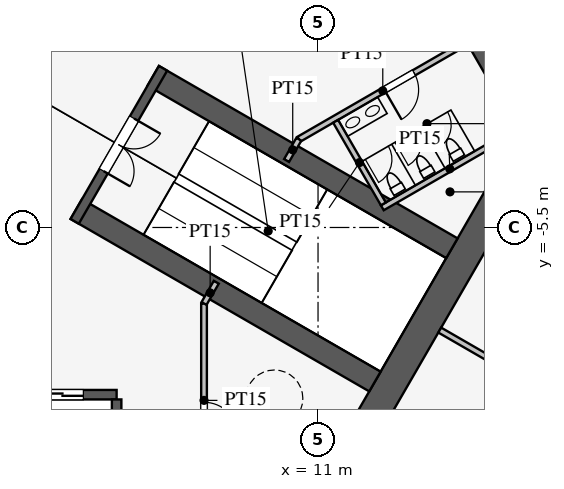
"""IFC4 building model, lengths in metres.
Left out: names, types, materials, properties, quantities, classifications, styles, units other than length and angle.
Written with IfcOpenShell. Run it as: python <this file> out.ifc"""

import sys

from ifc_helpers import new_model, si_unit, direction, frame, frame_2d, origin, place, context, subcontext, project, spatial, rectangle, extrude, element, fill, save


model = new_model("IFC4")
c1 = context("Model", 3, precision=1e-05, world=origin(), true_north=direction((0.0, 1.0)))
c2 = subcontext(c1, "Body", "Model", "MODEL_VIEW")
j1 = project(units=[si_unit("LENGTHUNIT", "METRE"), si_unit("PLANEANGLEUNIT", "RADIAN")], contexts=[c1])
p1 = place(None, origin())
s1 = spatial("IfcSite", under=j1, at=p1, CompositionType="ELEMENT")
p2 = place(p1, origin())
s2 = spatial("IfcBuilding", under=s1, at=p2, CompositionType="ELEMENT")
p3 = place(p2, frame((0.0, 0.0, 29.1)))
s3 = spatial("IfcBuildingStorey", under=s2, at=p3, CompositionType="ELEMENT", Elevation=29.1)
p4 = place(p3, frame((10.97, -13.0, 0.0), z_axis=(0.0, 0.0, 1.0), x_axis=(0.499995765644, 0.866027848477, 0.0)))
e1 = element("IfcWall", 1, at=p4, inside=s3, PredefinedType="SHEAR", context=c2, shape_type="SweptSolid", body=[
    extrude(rectangle(XDim=11.547, YDim=0.8, at=frame_2d((5.773, 0.0))), origin(), (0.0, 0.0, 1.0), 4.2),
])
p5 = place(p3, frame((16.743, -3.0, 0.0), z_axis=(0.0, 0.0, 1.0), x_axis=(-0.500002442456, 0.866023993627, 0.0)))
e2 = element("IfcWall", 2, at=p5, inside=s3, PredefinedType="SHEAR", context=c2, shape_type="SweptSolid", body=[
    extrude(rectangle(XDim=21.939, YDim=0.8, at=frame_2d((10.97, 0.0))), origin(), (0.0, 0.0, 1.0), 4.2),
])
p6 = place(p5, frame((17.27, 0.0, 0.0)))
e3 = element("IfcOpeningElement", 3, at=p6, cuts=e2, PredefinedType="OPENING", context=c2, shape_type="SweptSolid", body=[
    extrude(rectangle(XDim=1.2, YDim=2.1, at=frame_2d((0.6, 1.05))), frame((0.0, 0.41, 0.0), z_axis=(0.0, -1.0, 0.0), x_axis=(1.0, 0.0, 0.0)), (0.0, 0.0, 1.0), 0.82),
])
p7 = place(p5, frame((3.47, 0.0, 0.0)))
e4 = element("IfcOpeningElement", 4, at=p7, cuts=e2, PredefinedType="OPENING", context=c2, shape_type="SweptSolid", body=[
    extrude(rectangle(XDim=1.2, YDim=2.1, at=frame_2d((0.6, 1.05))), frame((0.0, 0.41, 0.0), z_axis=(0.0, -1.0, 0.0), x_axis=(1.0, 0.0, 0.0)), (0.0, 0.0, 1.0), 0.82),
])
p8 = place(p3, frame((-5.7, -9.9, 0.0), z_axis=(0.0, 0.0, 1.0), x_axis=(1.0, 0.0, 0.0)))
e5 = element("IfcWall", 5, at=p8, inside=s3, PredefinedType="SHEAR", context=c2, shape_type="SweptSolid", body=[
    extrude(rectangle(XDim=11.4, YDim=0.25, at=frame_2d((5.7, 0.0))), origin(), (0.0, 0.0, 1.0), 4.2),
])
p9 = place(p8, frame((0.875, 0.0, 0.0)))
e6 = element("IfcOpeningElement", 6, at=p9, cuts=e5, PredefinedType="OPENING", context=c2, shape_type="SweptSolid", body=[
    extrude(rectangle(XDim=1.1, YDim=2.2, at=frame_2d((0.55, 1.1))), frame((0.0, 0.135, 0.0), z_axis=(0.0, -1.0, 0.0), x_axis=(1.0, 0.0, 0.0)), (0.0, 0.0, 1.0), 0.27),
])
p10 = place(p8, frame((3.725, 0.0, 0.0)))
e7 = element("IfcOpeningElement", 7, at=p10, cuts=e5, PredefinedType="OPENING", context=c2, shape_type="SweptSolid", body=[
    extrude(rectangle(XDim=1.1, YDim=2.2, at=frame_2d((0.55, 1.1))), frame((0.0, 0.135, 0.0), z_axis=(0.0, -1.0, 0.0), x_axis=(1.0, 0.0, 0.0)), (0.0, 0.0, 1.0), 0.27),
])
p11 = place(p8, frame((6.575, 0.0, 0.0)))
e8 = element("IfcOpeningElement", 8, at=p11, cuts=e5, PredefinedType="OPENING", context=c2, shape_type="SweptSolid", body=[
    extrude(rectangle(XDim=1.1, YDim=2.2, at=frame_2d((0.55, 1.1))), frame((0.0, 0.135, 0.0), z_axis=(0.0, -1.0, 0.0), x_axis=(1.0, 0.0, 0.0)), (0.0, 0.0, 1.0), 0.27),
])
p12 = place(p8, frame((9.425, 0.0, 0.0)))
e9 = element("IfcOpeningElement", 9, at=p12, cuts=e5, PredefinedType="OPENING", context=c2, shape_type="SweptSolid", body=[
    extrude(rectangle(XDim=1.1, YDim=2.2, at=frame_2d((0.55, 1.1))), frame((0.0, 0.135, 0.0), z_axis=(0.0, -1.0, 0.0), x_axis=(1.0, 0.0, 0.0)), (0.0, 0.0, 1.0), 0.27),
])
p13 = place(p3, frame((5.7, -10.025, 0.0), z_axis=(0.0, 0.0, 1.0), x_axis=(0.0, -1.0, 0.0)))
e10 = element("IfcWall", 10, at=p13, inside=s3, PredefinedType="SHEAR", context=c2, shape_type="SweptSolid", body=[
    extrude(rectangle(XDim=2.575, YDim=0.25, at=frame_2d((1.288, 0.0))), origin(), (0.0, 0.0, 1.0), 4.2),
])
for number, where, z_axis, x_axis in (
    (11, (4.638, -5.016, 0.0), (0.0, 0.0, 1.0), (0.866, -0.5, 0.0)),
    (12, (6.663, -1.509, 0.0), (0.0, 0.0, 1.0), (0.866, -0.5, 0.0)),
):
    element("IfcWall", number, at=place(p3, frame(where, z_axis=z_axis, x_axis=x_axis)), inside=s3, PredefinedType="SHEAR", context=c2, shape_type="SweptSolid", body=[
        extrude(rectangle(XDim=9.075, YDim=0.6, at=frame_2d((4.538, 0.0))), origin(), (0.0, 0.0, 1.0), 4.2),
    ])
p14 = place(p3, frame((4.597, -5.339, 0.0), z_axis=(0.0, 0.0, 1.0), x_axis=(0.499984536904, 0.866034331223, 0.0)))
e13 = element("IfcWall", 13, at=p14, inside=s3, PredefinedType="SHEAR", context=c2, shape_type="SweptSolid", body=[
    extrude(rectangle(XDim=4.65, YDim=0.25, at=frame_2d((2.325, 0.0))), origin(), (0.0, 0.0, 1.0), 4.2),
])
p15 = place(p14, frame((1.525, 0.0, 0.0)))
e14 = element("IfcOpeningElement", 14, at=p15, cuts=e13, PredefinedType="OPENING", context=c2, shape_type="SweptSolid", body=[
    extrude(rectangle(XDim=1.6, YDim=2.1, at=frame_2d((0.8, 1.05))), frame((0.0, 0.135, 0.0), z_axis=(0.0, -1.0, 0.0), x_axis=(1.0, 0.0, 0.0)), (0.0, 0.0, 1.0), 0.27),
])
p16 = place(p3, frame((8.0, -7.5, 0.0), z_axis=(0.0, 0.0, 1.0), x_axis=(0.0, -1.0, 0.0)))
e15 = element("IfcWall", 15, at=p16, inside=s3, PredefinedType="PARTITIONING", context=c2, shape_type="SweptSolid", body=[
    extrude(rectangle(XDim=5.1, YDim=0.15, at=frame_2d((2.55, 0.0))), origin(), (0.0, 0.0, 1.0), 4.0),
])
p17 = place(p16, frame((2.6, 0.0, 0.0)))
e16 = element("IfcOpeningElement", 16, at=p17, cuts=e15, PredefinedType="OPENING", context=c2, shape_type="SweptSolid", body=[
    extrude(rectangle(XDim=0.9, YDim=2.1, at=frame_2d((0.45, 1.05))), frame((0.0, 0.085, 0.0), z_axis=(0.0, -1.0, 0.0), x_axis=(1.0, 0.0, 0.0)), (0.0, 0.0, 1.0), 0.17),
])
p18 = place(p3, frame((10.495, -3.178, 0.0), z_axis=(0.0, 0.0, 1.0), x_axis=(0.86602216432, 0.500005610874, 0.0)))
e17 = element("IfcWall", 17, at=p18, inside=s3, PredefinedType="PARTITIONING", context=c2, shape_type="SweptSolid", body=[
    extrude(rectangle(XDim=5.1, YDim=0.15, at=frame_2d((2.55, 0.0))), origin(), (0.0, 0.0, 1.0), 4.0),
])
p19 = place(p18, frame((2.6, 0.0, 0.0)))
e18 = element("IfcOpeningElement", 18, at=p19, cuts=e17, PredefinedType="OPENING", context=c2, shape_type="SweptSolid", body=[
    extrude(rectangle(XDim=0.9, YDim=2.1, at=frame_2d((0.45, 1.05))), frame((0.0, 0.085, 0.0), z_axis=(0.0, -1.0, 0.0), x_axis=(1.0, 0.0, 0.0)), (0.0, 0.0, 1.0), 0.17),
])
for number, where, z_axis, x_axis in (
    (19, (8.0, -7.5, 0.0), (0.0, 0.0, 1.0), (0.5, 0.866, 0.0)),
    (20, (10.495, -3.178, 0.0), (0.0, 0.0, 1.0), (-0.5, -0.866, 0.0)),
):
    element("IfcWall", number, at=place(p3, frame(where, z_axis=z_axis, x_axis=x_axis)), inside=s3, PredefinedType="PARTITIONING", context=c2, shape_type="SweptSolid", body=[
        extrude(rectangle(XDim=0.645, YDim=0.15, at=frame_2d((0.323, 0.0))), origin(), (0.0, 0.0, 1.0), 4.0),
    ])
p20 = place(p3, frame((12.691, -4.982, 0.0), z_axis=(0.0, 0.0, 1.0), x_axis=(0.8660249478, 0.500000789788, 0.0)))
e21 = element("IfcWall", 21, at=p20, inside=s3, PredefinedType="PARTITIONING", context=c2, shape_type="SweptSolid", body=[
    extrude(rectangle(XDim=4.1, YDim=0.15, at=frame_2d((2.05, 0.0))), origin(), (0.0, 0.0, 1.0), 4.0),
])
p21 = place(p3, frame((11.464, -2.706, 0.0), z_axis=(0.0, 0.0, 1.0), x_axis=(0.50001992892, -0.866013897511, 0.0)))
e22 = element("IfcWall", 22, at=p21, inside=s3, PredefinedType="PARTITIONING", context=c2, shape_type="SweptSolid", body=[
    extrude(rectangle(XDim=2.51, YDim=0.15, at=frame_2d((1.255, 0.0))), origin(), (0.0, 0.0, 1.0), 4.0),
])
p22 = place(p3, frame((14.203, -8.2, 0.0), z_axis=(0.0, 0.0, 1.0), x_axis=(0.866024965723, -0.500000758745, 0.0)))
e23 = element("IfcWall", 23, at=p22, inside=s3, PredefinedType="PARTITIONING", context=c2, shape_type="SweptSolid", body=[
    extrude(rectangle(XDim=18.25, YDim=0.15, at=frame_2d((9.125, 0.0))), origin(), (0.0, 0.0, 1.0), 2.3),
])
p23 = place(p17, origin())
e24 = element("IfcDoor", 24, at=p23, inside=s3, OperationType="SINGLE_SWING_RIGHT", PredefinedType="DOOR", context=c2, shape_type="SweptSolid", body=[
    extrude(rectangle(XDim=0.9, YDim=2.1, at=frame_2d((0.45, 1.05))), frame((0.0, 0.025, 0.0), z_axis=(0.0, -1.0, 0.0), x_axis=(1.0, 0.0, 0.0)), (0.0, 0.0, 1.0), 0.05),
])
fill(e16, e24)
p24 = place(p19, frame((0.9, 0.0, 0.0), z_axis=(0.0, 0.0, 1.0), x_axis=(-1.0, 0.0, 0.0)))
e25 = element("IfcDoor", 25, at=p24, inside=s3, OperationType="SINGLE_SWING_RIGHT", PredefinedType="DOOR", context=c2, shape_type="SweptSolid", body=[
    extrude(rectangle(XDim=0.9, YDim=2.1, at=frame_2d((0.45, 1.05))), frame((0.0, 0.025, 0.0), z_axis=(0.0, -1.0, 0.0), x_axis=(1.0, 0.0, 0.0)), (0.0, 0.0, 1.0), 0.05),
])
fill(e18, e25)
p25 = place(p15, frame((1.6, 0.0, 0.0), z_axis=(0.0, 0.0, 1.0), x_axis=(-1.0, 0.0, 0.0)))
e26 = element("IfcDoor", 26, at=p25, inside=s3, OperationType="DOUBLE_DOOR_SINGLE_SWING", PredefinedType="DOOR", context=c2, shape_type="SweptSolid", body=[
    extrude(rectangle(XDim=1.6, YDim=2.1, at=frame_2d((0.8, 1.05))), frame((0.0, 0.025, 0.0), z_axis=(0.0, -1.0, 0.0), x_axis=(1.0, 0.0, 0.0)), (0.0, 0.0, 1.0), 0.05),
])
fill(e14, e26)
p26 = place(p12, origin())
e27 = element("IfcDoor", 27, at=p26, inside=s3, OperationType="DOUBLE_DOOR_SLIDING", PredefinedType="DOOR", context=c2, shape_type="SweptSolid", body=[
    extrude(rectangle(XDim=1.1, YDim=2.2, at=frame_2d((0.55, 1.1))), frame((0.0, 0.025, 0.0), z_axis=(0.0, -1.0, 0.0), x_axis=(1.0, 0.0, 0.0)), (0.0, 0.0, 1.0), 0.05),
])
fill(e9, e27)
save(model, sys.argv[1])
